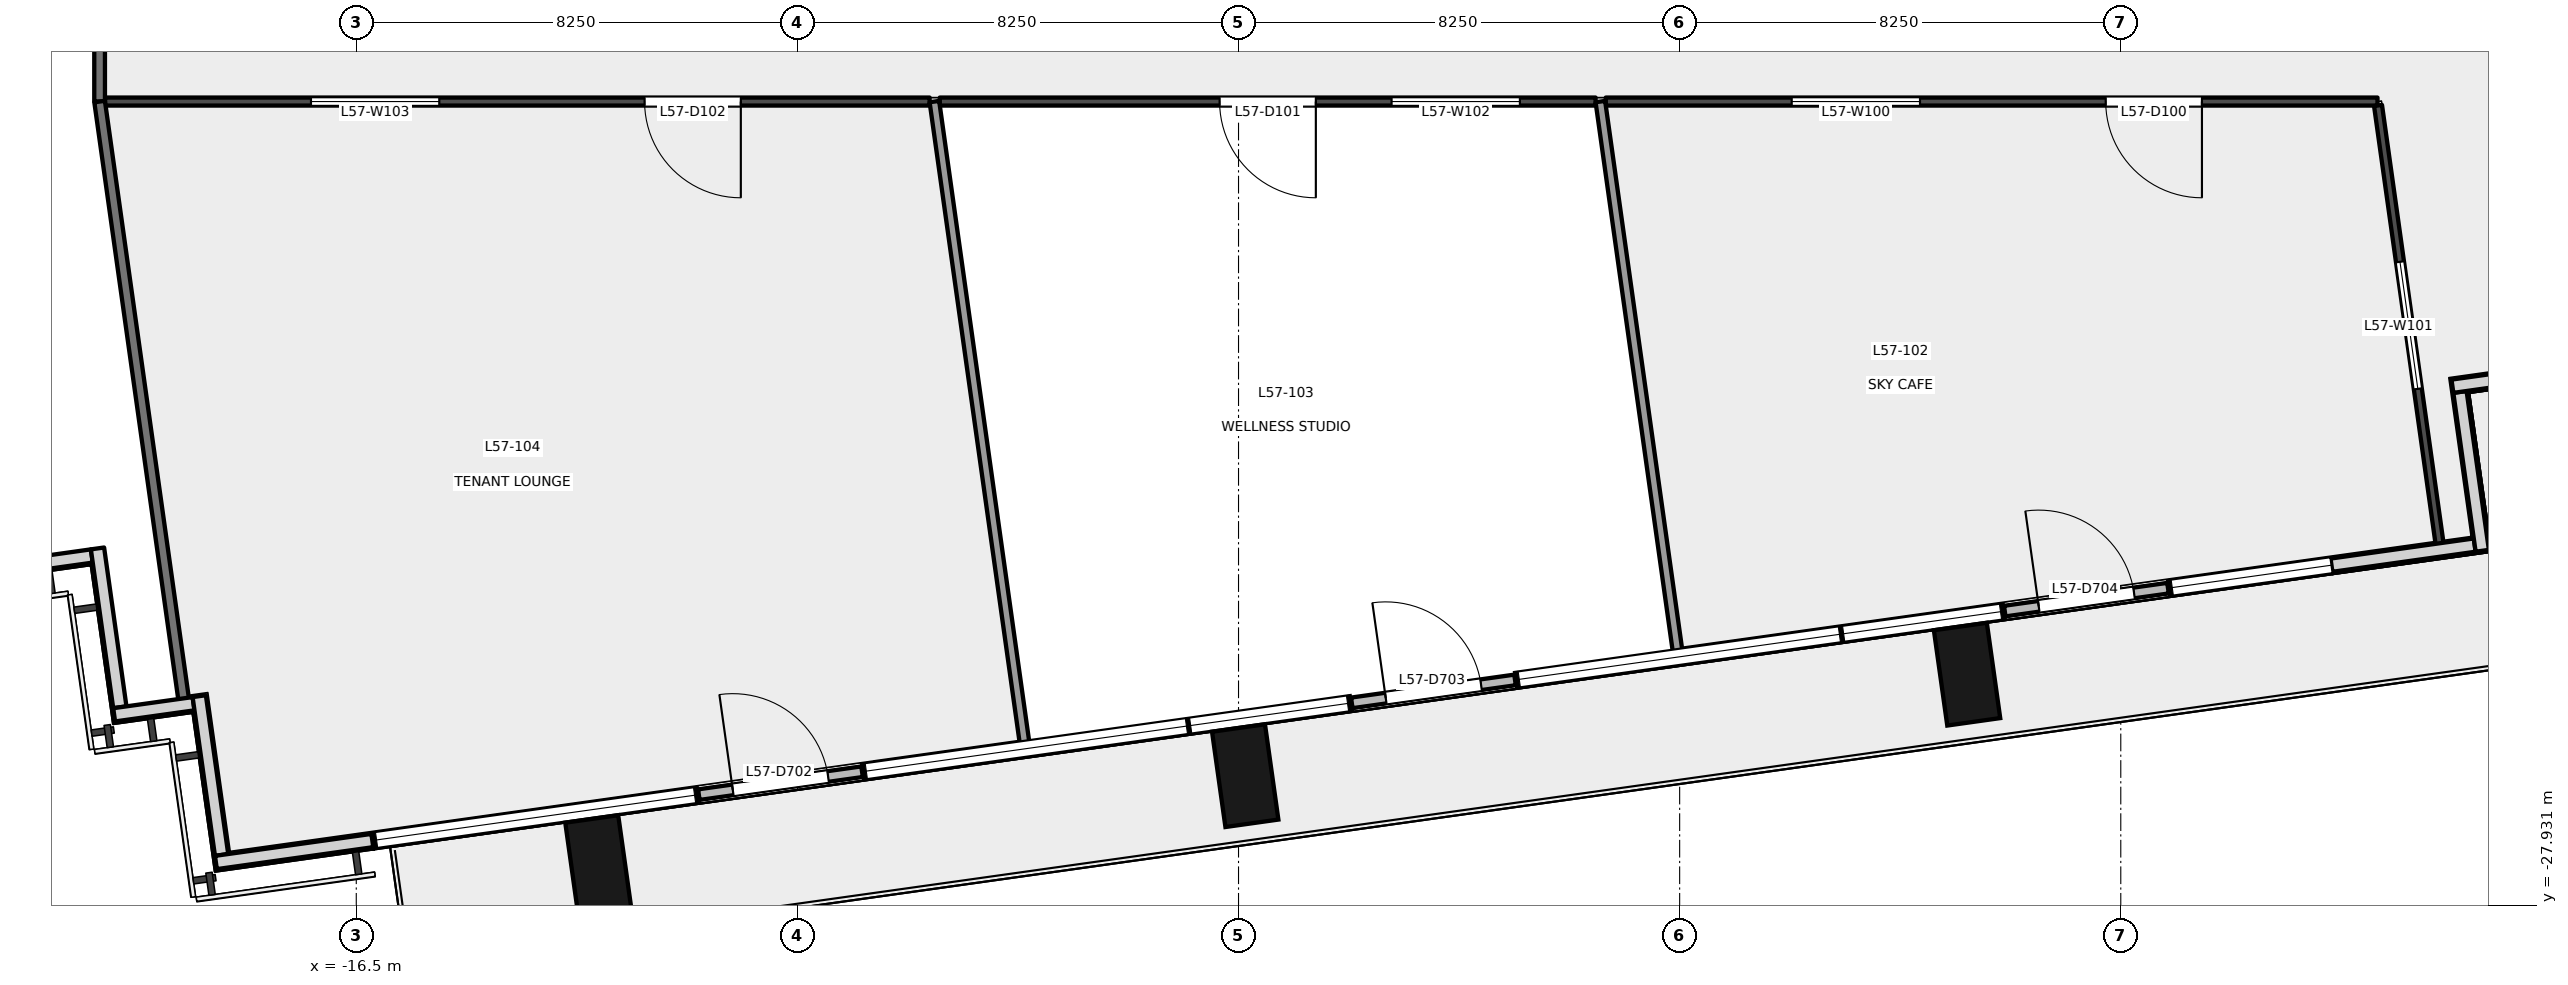
"""IFC4 building model, lengths in metres.
Left out: names, types, materials, properties, quantities, classifications, styles, units other than length and angle.
Written with IfcOpenShell. Run it as: python <this file> out.ifc"""

import sys

from ifc_helpers import new_model, si_unit, direction, frame, frame_2d, origin, origin_2d, place, context, subcontext, project, spatial, rectangle, extrude, element, fill, save


model = new_model("IFC4")
c1 = context("Model", 3, precision=1e-05, world=origin(), true_north=direction((0.0, 1.0)))
c2 = subcontext(c1, "Body", "Model", "MODEL_VIEW")
j1 = project(units=[si_unit("LENGTHUNIT", "METRE"), si_unit("PLANEANGLEUNIT", "RADIAN")], contexts=[c1])
p1 = place(None, origin())
s1 = spatial("IfcSite", under=j1, at=p1, CompositionType="ELEMENT")
p2 = place(p1, origin())
s2 = spatial("IfcBuilding", under=s1, at=p2, CompositionType="ELEMENT")
p3 = place(p2, frame((0.0, 0.0, 249.7)))
s3 = spatial("IfcBuildingStorey", under=s2, at=p3, CompositionType="ELEMENT", Elevation=249.7)
for number, where, z_axis, x_axis in (
    (1, (-11.971, -27.209, -0.2), (0.0, 0.0, 1.0), (0.99, 0.139, 0.0)),
    (2, (0.125, -25.508, -0.2), (0.0, 0.0, 1.0), (0.99, 0.139, 0.0)),
    (3, (13.625, -23.61, -0.2), (0.0, 0.0, 1.0), (0.99, 0.139, 0.0)),
):
    element("IfcColumn", number, at=place(p3, frame(where, z_axis=z_axis, x_axis=x_axis)), inside=s3, PredefinedType="COLUMN", context=c2, shape_type="SweptSolid", body=[
        extrude(rectangle(XDim=1.0, YDim=1.8, at=origin_2d()), origin(), (0.0, 0.0, 1.0), 5.4),
    ])
p4 = place(p3, frame((20.44, -21.572, 0.0), z_axis=(0.0, 0.0, 1.0), x_axis=(0.990293105353, 0.138994839796, 0.0)))
e4 = element("IfcWall", 4, at=p4, inside=s3, PredefinedType="SOLIDWALL", context=c2, shape_type="SweptSolid", body=[
    extrude(rectangle(XDim=2.705, YDim=0.25, at=frame_2d((1.353, 0.0))), origin(), (0.0, 0.0, 1.0), 5.2),
])
p5 = place(p3, frame((23.26, -21.302, 0.0), z_axis=(0.0, 0.0, 1.0), x_axis=(-0.138994228812, 0.990293191109, 0.0)))
e5 = element("IfcWall", 5, at=p5, inside=s3, PredefinedType="SOLIDWALL", context=c2, shape_type="SweptSolid", body=[
    extrude(rectangle(XDim=3.0, YDim=0.25, at=frame_2d((1.5, 0.0))), origin(), (0.0, 0.0, 1.0), 5.2),
])
p6 = place(p3, frame((22.702, -18.225, 0.0), z_axis=(0.0, 0.0, 1.0), x_axis=(0.990243596651, 0.13934711799, 0.0)))
e6 = element("IfcWall", 6, at=p6, inside=s3, PredefinedType="SOLIDWALL", context=c2, shape_type="SweptSolid", body=[
    extrude(rectangle(XDim=1.5, YDim=0.25, at=frame_2d((0.75, 0.0))), origin(), (0.0, 0.0, 1.0), 5.2),
])
p7 = place(p3, frame((-22.956, -21.612, 0.0), z_axis=(0.0, 0.0, 1.0), x_axis=(0.990248296447, 0.139313715703, 0.0)))
e7 = element("IfcWall", 7, at=p7, inside=s3, PredefinedType="SOLIDWALL", context=c2, shape_type="SweptSolid", body=[
    extrude(rectangle(XDim=1.525, YDim=0.25, at=frame_2d((0.762, 0.0))), origin(), (0.0, 0.0, 1.0), 5.2),
])
p8 = place(p3, frame((-21.34, -21.258, 0.0), z_axis=(0.0, 0.0, 1.0), x_axis=(0.139393225799, -0.990237107263, 0.0)))
e8 = element("IfcWall", 8, at=p8, inside=s3, PredefinedType="SOLIDWALL", context=c2, shape_type="SweptSolid", body=[
    extrude(rectangle(XDim=3.0, YDim=0.25, at=frame_2d((1.5, 0.0))), origin(), (0.0, 0.0, 1.0), 5.2),
])
p9 = place(p3, frame((-21.028, -24.37, 0.0), z_axis=(0.0, 0.0, 1.0), x_axis=(0.990330117064, 0.138730887823, 0.0)))
e9 = element("IfcWall", 9, at=p9, inside=s3, PredefinedType="SOLIDWALL", context=c2, shape_type="SweptSolid", body=[
    extrude(rectangle(XDim=1.499, YDim=0.25, at=frame_2d((0.75, 0.0))), origin(), (0.0, 0.0, 1.0), 5.2),
])
p10 = place(p3, frame((-19.437, -24.021, 0.0), z_axis=(0.0, 0.0, 1.0), x_axis=(0.139358350296, -0.990242015975, 0.0)))
e10 = element("IfcWall", 10, at=p10, inside=s3, PredefinedType="SOLIDWALL", context=c2, shape_type="SweptSolid", body=[
    extrude(rectangle(XDim=2.999, YDim=0.25, at=frame_2d((1.5, 0.0))), origin(), (0.0, 0.0, 1.0), 5.2),
])
p11 = place(p3, frame((-19.125, -27.132, 0.0), z_axis=(0.0, 0.0, 1.0), x_axis=(0.990291981483, 0.139002846771, 0.0)))
e11 = element("IfcWall", 11, at=p11, inside=s3, PredefinedType="SOLIDWALL", context=c2, shape_type="SweptSolid", body=[
    extrude(rectangle(XDim=2.954, YDim=0.25, at=frame_2d((1.477, 0.0))), origin(), (0.0, 0.0, 1.0), 5.2),
])
p12 = place(p3, frame((-10.094, -25.864, 0.0), z_axis=(0.0, 0.0, 1.0), x_axis=(0.990262208678, 0.139214791112, 0.0)))
e12 = element("IfcWall", 12, at=p12, inside=s3, PredefinedType="SOLIDWALL", context=c2, shape_type="SweptSolid", body=[
    extrude(rectangle(XDim=3.083, YDim=0.2, at=frame_2d((1.542, 0.0))), origin(), (0.0, 0.0, 1.0), 4.1),
])
p13 = place(p12, frame((0.642, 0.0, 0.0)))
e13 = element("IfcOpeningElement", 13, at=p13, cuts=e12, PredefinedType="OPENING", context=c2, shape_type="SweptSolid", body=[
    extrude(rectangle(XDim=1.8, YDim=2.4, at=frame_2d((0.9, 1.2))), frame((0.0, 0.111, 0.0), z_axis=(0.0, -1.0, 0.0), x_axis=(1.0, 0.0, 0.0)), (0.0, 0.0, 1.0), 0.221),
])
p14 = place(p3, frame((2.118, -24.147, 0.0), z_axis=(0.0, 0.0, 1.0), x_axis=(0.990263743246, 0.13920387499, 0.0)))
e14 = element("IfcWall", 14, at=p14, inside=s3, PredefinedType="SOLIDWALL", context=c2, shape_type="SweptSolid", body=[
    extrude(rectangle(XDim=3.083, YDim=0.2, at=frame_2d((1.542, 0.0))), origin(), (0.0, 0.0, 1.0), 4.1),
])
p15 = place(p14, frame((0.642, 0.0, 0.0)))
e15 = element("IfcOpeningElement", 15, at=p15, cuts=e14, PredefinedType="OPENING", context=c2, shape_type="SweptSolid", body=[
    extrude(rectangle(XDim=1.8, YDim=2.4, at=frame_2d((0.9, 1.2))), frame((0.0, 0.111, 0.0), z_axis=(0.0, -1.0, 0.0), x_axis=(1.0, 0.0, 0.0)), (0.0, 0.0, 1.0), 0.221),
])
p16 = place(p3, frame((14.33, -22.43, 0.0), z_axis=(0.0, 0.0, 1.0), x_axis=(0.990273122723, 0.139137135276, 0.0)))
e16 = element("IfcWall", 16, at=p16, inside=s3, PredefinedType="SOLIDWALL", context=c2, shape_type="SweptSolid", body=[
    extrude(rectangle(XDim=3.083, YDim=0.2, at=frame_2d((1.542, 0.0))), origin(), (0.0, 0.0, 1.0), 4.1),
])
p17 = place(p16, frame((0.642, 0.0, 0.0)))
e17 = element("IfcOpeningElement", 17, at=p17, cuts=e16, PredefinedType="OPENING", context=c2, shape_type="SweptSolid", body=[
    extrude(rectangle(XDim=1.8, YDim=2.4, at=frame_2d((0.9, 1.2))), frame((0.0, 0.111, 0.0), z_axis=(0.0, -1.0, 0.0), x_axis=(1.0, 0.0, 0.0)), (0.0, 0.0, 1.0), 0.221),
])
p18 = place(p3, frame((21.301, -12.9, 0.0), z_axis=(0.0, 0.0, 1.0), x_axis=(-1.0, 0.0, 0.0)))
e18 = element("IfcWall", 18, at=p18, inside=s3, PredefinedType="PARTITIONING", context=c2, shape_type="SweptSolid", body=[
    extrude(rectangle(XDim=14.433, YDim=0.15, at=frame_2d((7.217, 0.0))), origin(), (0.0, 0.0, 1.0), 4.5),
])
p19 = place(p18, frame((3.283, 0.0, 0.0)))
e19 = element("IfcOpeningElement", 19, at=p19, cuts=e18, PredefinedType="OPENING", context=c2, shape_type="SweptSolid", body=[
    extrude(rectangle(XDim=1.8, YDim=2.1, at=frame_2d((0.9, 1.05))), frame((0.0, 0.085, 0.0), z_axis=(0.0, -1.0, 0.0), x_axis=(1.0, 0.0, 0.0)), (0.0, 0.0, 1.0), 0.171),
])
p20 = place(p18, frame((8.556, 0.0, 0.0)))
e20 = element("IfcOpeningElement", 20, at=p20, cuts=e18, PredefinedType="OPENING", context=c2, shape_type="SweptSolid", body=[
    extrude(rectangle(XDim=2.4, YDim=2.4, at=frame_2d((1.2, 1.2))), frame((0.0, 0.085, 0.0), z_axis=(0.0, -1.0, 0.0), x_axis=(1.0, 0.0, 0.0)), (0.0, 0.0, 1.0), 0.171),
])
p21 = place(p3, frame((22.466, -21.197, 0.0), z_axis=(0.0, 0.0, 1.0), x_axis=(-0.139079162596, 0.990281266374, 0.0)))
e21 = element("IfcWall", 21, at=p21, inside=s3, PredefinedType="PARTITIONING", context=c2, shape_type="SweptSolid", body=[
    extrude(rectangle(XDim=8.305, YDim=0.15, at=frame_2d((4.152, 0.0))), origin(), (0.0, 0.0, 1.0), 5.2),
])
p22 = place(p21, frame((2.952, 0.0, 0.0)))
e22 = element("IfcOpeningElement", 22, at=p22, cuts=e21, PredefinedType="OPENING", context=c2, shape_type="SweptSolid", body=[
    extrude(rectangle(XDim=2.4, YDim=2.4, at=frame_2d((1.2, 1.2))), frame((0.0, 0.085, 0.0), z_axis=(0.0, -1.0, 0.0), x_axis=(1.0, 0.0, 0.0)), (0.0, 0.0, 1.0), 0.171),
])
p23 = place(p3, frame((6.678, -12.9, 0.0), z_axis=(0.0, 0.0, 1.0), x_axis=(-1.0, 0.0, 0.0)))
e23 = element("IfcWall", 23, at=p23, inside=s3, PredefinedType="PARTITIONING", context=c2, shape_type="SweptSolid", body=[
    extrude(rectangle(XDim=12.265, YDim=0.15, at=frame_2d((6.132, 0.0))), origin(), (0.0, 0.0, 1.0), 4.3),
])
p24 = place(p23, frame((5.232, 0.0, 0.0)))
e24 = element("IfcOpeningElement", 24, at=p24, cuts=e23, PredefinedType="OPENING", context=c2, shape_type="SweptSolid", body=[
    extrude(rectangle(XDim=1.8, YDim=2.1, at=frame_2d((0.9, 1.05))), frame((0.0, 0.085, 0.0), z_axis=(0.0, -1.0, 0.0), x_axis=(1.0, 0.0, 0.0)), (0.0, 0.0, 1.0), 0.171),
])
p25 = place(p23, frame((1.416, 0.0, 0.0)))
e25 = element("IfcOpeningElement", 25, at=p25, cuts=e23, PredefinedType="OPENING", context=c2, shape_type="SweptSolid", body=[
    extrude(rectangle(XDim=2.4, YDim=2.4, at=frame_2d((1.2, 1.2))), frame((0.0, 0.085, 0.0), z_axis=(0.0, -1.0, 0.0), x_axis=(1.0, 0.0, 0.0)), (0.0, 0.0, 1.0), 0.171),
])
p26 = place(p3, frame((-5.777, -12.9, 0.0), z_axis=(0.0, 0.0, 1.0), x_axis=(-1.0, 0.0, 0.0)))
e26 = element("IfcWall", 26, at=p26, inside=s3, PredefinedType="PARTITIONING", context=c2, shape_type="SweptSolid", body=[
    extrude(rectangle(XDim=15.423, YDim=0.15, at=frame_2d((7.711, 0.0))), origin(), (0.0, 0.0, 1.0), 4.3),
])
p27 = place(p26, frame((3.531, 0.0, 0.0)))
e27 = element("IfcOpeningElement", 27, at=p27, cuts=e26, PredefinedType="OPENING", context=c2, shape_type="SweptSolid", body=[
    extrude(rectangle(XDim=1.8, YDim=2.1, at=frame_2d((0.9, 1.05))), frame((0.0, 0.085, 0.0), z_axis=(0.0, -1.0, 0.0), x_axis=(1.0, 0.0, 0.0)), (0.0, 0.0, 1.0), 0.171),
])
p28 = place(p26, frame((9.17, 0.0, 0.0)))
e28 = element("IfcOpeningElement", 28, at=p28, cuts=e26, PredefinedType="OPENING", context=c2, shape_type="SweptSolid", body=[
    extrude(rectangle(XDim=2.4, YDim=2.4, at=frame_2d((1.2, 1.2))), frame((0.0, 0.085, 0.0), z_axis=(0.0, -1.0, 0.0), x_axis=(1.0, 0.0, 0.0)), (0.0, 0.0, 1.0), 0.171),
])
p29 = place(p3, frame((-21.3, -12.9, 0.0), z_axis=(0.0, 0.0, 1.0), x_axis=(0.0, 1.0, 0.0)))
e29 = element("IfcWall", 29, at=p29, inside=s3, PredefinedType="PARTITIONING", context=c2, shape_type="SweptSolid", body=[
    extrude(rectangle(XDim=20.4, YDim=0.2, at=frame_2d((10.2, 0.0))), origin(), (0.0, 0.0, 1.0), 4.8),
])
p30 = place(p29, frame((9.75, 0.0, 0.0)))
e30 = element("IfcOpeningElement", 30, at=p30, cuts=e29, PredefinedType="OPENING", context=c2, shape_type="SweptSolid", body=[
    extrude(rectangle(XDim=0.9, YDim=2.1, at=frame_2d((0.45, 1.05))), frame((0.0, 0.111, 0.0), z_axis=(0.0, -1.0, 0.0), x_axis=(1.0, 0.0, 0.0)), (0.0, 0.0, 1.0), 0.221),
])
p31 = place(p3, frame((8.214, -23.2, 0.0), z_axis=(0.0, 0.0, 1.0), x_axis=(-0.139120683078, 0.99027543418, 0.0)))
e31 = element("IfcWall", 31, at=p31, inside=s3, PredefinedType="PARTITIONING", context=c2, shape_type="SweptSolid", body=[
    extrude(rectangle(XDim=10.401, YDim=0.18, at=frame_2d((5.201, 0.0))), origin(), (0.0, 0.0, 1.0), 5.2),
])
p32 = place(p3, frame((-3.999, -24.916, 0.0), z_axis=(0.0, 0.0, 1.0), x_axis=(-0.139190092612, 0.990265680572, 0.0)))
e32 = element("IfcWall", 32, at=p32, inside=s3, PredefinedType="PARTITIONING", context=c2, shape_type="SweptSolid", body=[
    extrude(rectangle(XDim=12.134, YDim=0.18, at=frame_2d((6.067, 0.0))), origin(), (0.0, 0.0, 1.0), 4.3),
])
p33 = place(p3, frame((-19.726, -24.097, 0.0), z_axis=(0.0, 0.0, 1.0), x_axis=(-0.139202229338, 0.990263974578, 0.0)))
e33 = element("IfcWall", 33, at=p33, inside=s3, PredefinedType="PARTITIONING", context=c2, shape_type="SweptSolid", body=[
    extrude(rectangle(XDim=11.307, YDim=0.2, at=frame_2d((5.654, 0.0))), origin(), (0.0, 0.0, 1.0), 5.2),
])
p34 = place(p13, origin())
e34 = element("IfcDoor", 34, at=p34, inside=s3, OperationType="DOUBLE_DOOR_SINGLE_SWING", PredefinedType="DOOR", context=c2, shape_type="SweptSolid", body=[
    extrude(rectangle(XDim=1.8, YDim=2.4, at=frame_2d((0.9, 1.2))), frame((0.0, 0.025, 0.0), z_axis=(0.0, -1.0, 0.0), x_axis=(1.0, 0.0, 0.0)), (0.0, 0.0, 1.0), 0.05),
])
fill(e13, e34)
p35 = place(p15, origin())
e35 = element("IfcDoor", 35, at=p35, inside=s3, OperationType="DOUBLE_DOOR_SINGLE_SWING", PredefinedType="DOOR", context=c2, shape_type="SweptSolid", body=[
    extrude(rectangle(XDim=1.8, YDim=2.4, at=frame_2d((0.9, 1.2))), frame((0.0, 0.025, 0.0), z_axis=(0.0, -1.0, 0.0), x_axis=(1.0, 0.0, 0.0)), (0.0, 0.0, 1.0), 0.05),
])
fill(e15, e35)
p36 = place(p17, origin())
e36 = element("IfcDoor", 36, at=p36, inside=s3, OperationType="DOUBLE_DOOR_SINGLE_SWING", PredefinedType="DOOR", context=c2, shape_type="SweptSolid", body=[
    extrude(rectangle(XDim=1.8, YDim=2.4, at=frame_2d((0.9, 1.2))), frame((0.0, 0.025, 0.0), z_axis=(0.0, -1.0, 0.0), x_axis=(1.0, 0.0, 0.0)), (0.0, 0.0, 1.0), 0.05),
])
fill(e17, e36)
p37 = place(p19, origin())
e37 = element("IfcDoor", 37, at=p37, inside=s3, OperationType="DOUBLE_DOOR_SINGLE_SWING", PredefinedType="DOOR", context=c2, shape_type="SweptSolid", body=[
    extrude(rectangle(XDim=1.8, YDim=2.1, at=frame_2d((0.9, 1.05))), frame((0.0, 0.025, 0.0), z_axis=(0.0, -1.0, 0.0), x_axis=(1.0, 0.0, 0.0)), (0.0, 0.0, 1.0), 0.05),
])
fill(e19, e37)
p38 = place(p24, origin())
e38 = element("IfcDoor", 38, at=p38, inside=s3, OperationType="DOUBLE_DOOR_SINGLE_SWING", PredefinedType="DOOR", context=c2, shape_type="SweptSolid", body=[
    extrude(rectangle(XDim=1.8, YDim=2.1, at=frame_2d((0.9, 1.05))), frame((0.0, 0.025, 0.0), z_axis=(0.0, -1.0, 0.0), x_axis=(1.0, 0.0, 0.0)), (0.0, 0.0, 1.0), 0.05),
])
fill(e24, e38)
p39 = place(p27, origin())
e39 = element("IfcDoor", 39, at=p39, inside=s3, OperationType="DOUBLE_DOOR_SINGLE_SWING", PredefinedType="DOOR", context=c2, shape_type="SweptSolid", body=[
    extrude(rectangle(XDim=1.8, YDim=2.1, at=frame_2d((0.9, 1.05))), frame((0.0, 0.025, 0.0), z_axis=(0.0, -1.0, 0.0), x_axis=(1.0, 0.0, 0.0)), (0.0, 0.0, 1.0), 0.05),
])
fill(e27, e39)
p40 = place(p20, origin())
e40 = element("IfcWindow", 40, at=p40, inside=s3, PartitioningType="SINGLE_PANEL", PredefinedType="WINDOW", context=c2, shape_type="SweptSolid", body=[
    extrude(rectangle(XDim=2.4, YDim=2.4, at=frame_2d((1.2, 1.2))), frame((0.0, 0.03, 0.0), z_axis=(0.0, -1.0, 0.0), x_axis=(1.0, 0.0, 0.0)), (0.0, 0.0, 1.0), 0.06),
])
fill(e20, e40)
p41 = place(p22, origin())
e41 = element("IfcWindow", 41, at=p41, inside=s3, PartitioningType="SINGLE_PANEL", PredefinedType="WINDOW", context=c2, shape_type="SweptSolid", body=[
    extrude(rectangle(XDim=2.4, YDim=2.4, at=frame_2d((1.2, 1.2))), frame((0.0, 0.03, 0.0), z_axis=(0.0, -1.0, 0.0), x_axis=(1.0, 0.0, 0.0)), (0.0, 0.0, 1.0), 0.06),
])
fill(e22, e41)
p42 = place(p25, origin())
e42 = element("IfcWindow", 42, at=p42, inside=s3, PartitioningType="SINGLE_PANEL", PredefinedType="WINDOW", context=c2, shape_type="SweptSolid", body=[
    extrude(rectangle(XDim=2.4, YDim=2.4, at=frame_2d((1.2, 1.2))), frame((0.0, 0.03, 0.0), z_axis=(0.0, -1.0, 0.0), x_axis=(1.0, 0.0, 0.0)), (0.0, 0.0, 1.0), 0.06),
])
fill(e25, e42)
p43 = place(p28, origin())
e43 = element("IfcWindow", 43, at=p43, inside=s3, PartitioningType="SINGLE_PANEL", PredefinedType="WINDOW", context=c2, shape_type="SweptSolid", body=[
    extrude(rectangle(XDim=2.4, YDim=2.4, at=frame_2d((1.2, 1.2))), frame((0.0, 0.03, 0.0), z_axis=(0.0, -1.0, 0.0), x_axis=(1.0, 0.0, 0.0)), (0.0, 0.0, 1.0), 0.06),
])
fill(e28, e43)
save(model, sys.argv[1])
